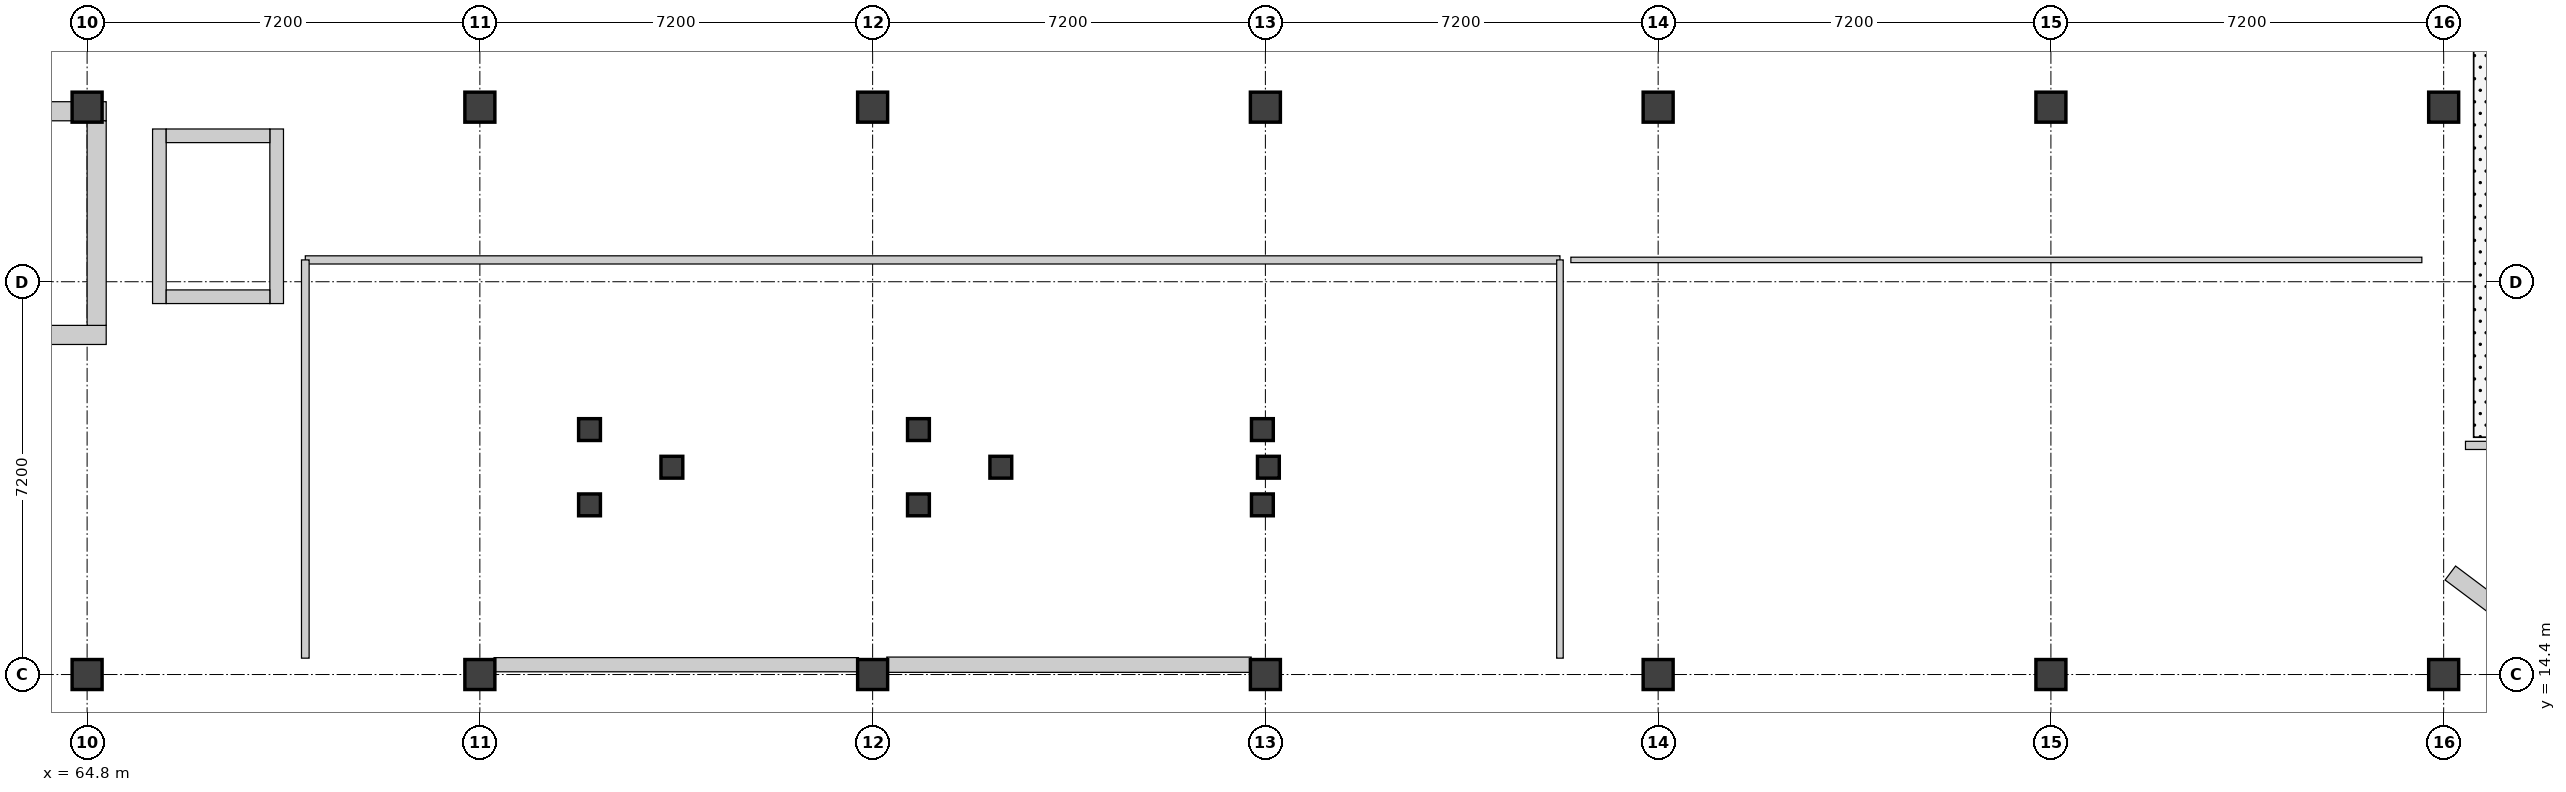
"""IFC4 building model, lengths in metres.
Left out: names, types, materials, properties, quantities, classifications, styles, units other than length and angle.
Written with IfcOpenShell. Run it as: python <this file> out.ifc"""

import sys

from ifc_helpers import new_model, si_unit, direction, frame, frame_2d, origin, origin_2d, place, context, subcontext, project, spatial, rectangle, extrude, element, fill, save


model = new_model("IFC4")
c1 = context("Model", 3, precision=1e-05, world=origin(), true_north=direction((0.0, 1.0)))
c2 = subcontext(c1, "Body", "Model", "MODEL_VIEW")
j1 = project(units=[si_unit("LENGTHUNIT", "METRE"), si_unit("PLANEANGLEUNIT", "RADIAN")], contexts=[c1])
p1 = place(None, origin())
s1 = spatial("IfcSite", under=j1, at=p1, CompositionType="ELEMENT")
p2 = place(p1, origin())
s2 = spatial("IfcBuilding", under=s1, at=p2, CompositionType="ELEMENT")
p3 = place(p2, origin())
s3 = spatial("IfcBuildingStorey", under=s2, at=p3, CompositionType="ELEMENT", Elevation=0.0)
for number, where, z_axis, x_axis in (
    (1, (64.8, 14.4, 0.0), (0.0, 0.0, 1.0), (1.0, 0.0, 0.0)),
    (2, (64.8, 24.8, 0.0), (0.0, 0.0, 1.0), (1.0, 0.0, 0.0)),
    (3, (72.0, 14.4, 0.0), (0.0, 0.0, 1.0), (1.0, 0.0, 0.0)),
    (4, (72.0, 24.8, 0.0), (0.0, 0.0, 1.0), (1.0, 0.0, 0.0)),
    (5, (79.2, 14.4, 0.0), (0.0, 0.0, 1.0), (1.0, 0.0, 0.0)),
    (6, (79.2, 24.8, 0.0), (0.0, 0.0, 1.0), (1.0, 0.0, 0.0)),
    (7, (86.4, 14.4, 0.0), (0.0, 0.0, 1.0), (1.0, 0.0, 0.0)),
    (8, (86.4, 24.8, 0.0), (0.0, 0.0, 1.0), (1.0, 0.0, 0.0)),
    (9, (93.6, 14.4, 0.0), (0.0, 0.0, 1.0), (1.0, 0.0, 0.0)),
    (10, (93.6, 24.8, 0.0), (0.0, 0.0, 1.0), (1.0, 0.0, 0.0)),
    (11, (100.8, 14.4, 0.0), (0.0, 0.0, 1.0), (1.0, 0.0, 0.0)),
    (12, (100.8, 24.8, 0.0), (0.0, 0.0, 1.0), (1.0, 0.0, 0.0)),
    (13, (108.0, 14.4, 0.0), (0.0, 0.0, 1.0), (1.0, 0.0, 0.0)),
    (14, (108.0, 24.8, 0.0), (0.0, 0.0, 1.0), (1.0, 0.0, 0.0)),
):
    element("IfcColumn", number, at=place(p3, frame(where, z_axis=z_axis, x_axis=x_axis)), inside=s3, PredefinedType="COLUMN", context=c2, shape_type="SweptSolid", body=[
        extrude(rectangle(XDim=0.55, YDim=0.55, at=origin_2d()), origin(), (0.0, 0.0, 1.0), 4.5),
    ])
p4 = place(p3, frame((86.14, 14.58, 0.0), z_axis=(0.0, 0.0, 1.0), x_axis=(-1.0, 0.0, 0.0)))
e15 = element("IfcWall", 15, at=p4, inside=s3, PredefinedType="SOLIDWALL", context=c2, shape_type="SweptSolid", body=[
    extrude(rectangle(XDim=6.68, YDim=0.28, at=frame_2d((3.34, 0.0))), origin(), (0.0, 0.0, 1.0), 3.54),
])
p5 = place(p4, frame((2.64, 0.0, 0.0)))
e16 = element("IfcOpeningElement", 16, at=p5, cuts=e15, PredefinedType="OPENING", context=c2, shape_type="SweptSolid", body=[
    extrude(rectangle(XDim=1.4, YDim=2.2, at=frame_2d((0.7, 1.1))), frame((0.0, 0.15, 0.0), z_axis=(0.0, -1.0, 0.0), x_axis=(1.0, 0.0, 0.0)), (0.0, 0.0, 1.0), 0.3),
])
p6 = place(p3, frame((78.94, 14.58, 0.0), z_axis=(0.0, 0.0, 1.0), x_axis=(-1.0, 0.0, 0.0)))
e17 = element("IfcWall", 17, at=p6, inside=s3, PredefinedType="SOLIDWALL", context=c2, shape_type="SweptSolid", body=[
    extrude(rectangle(XDim=6.68, YDim=0.26, at=frame_2d((3.34, 0.0))), origin(), (0.0, 0.0, 1.0), 3.49),
])
p7 = place(p6, frame((2.44, 0.0, 0.0)))
e18 = element("IfcOpeningElement", 18, at=p7, cuts=e17, PredefinedType="OPENING", context=c2, shape_type="SweptSolid", body=[
    extrude(rectangle(XDim=1.8, YDim=2.4, at=frame_2d((0.9, 1.2))), frame((0.0, 0.14, 0.0), z_axis=(0.0, -1.0, 0.0), x_axis=(1.0, 0.0, 0.0)), (0.0, 0.0, 1.0), 0.28),
])
p8 = place(p3, frame((110.494, 14.481, 0.0), z_axis=(0.0, 0.0, 1.0), x_axis=(-0.799792449124, 0.600276634831, 0.0)))
e19 = element("IfcWall", 19, at=p8, inside=s3, PredefinedType="SOLIDWALL", context=c2, shape_type="SweptSolid", body=[
    extrude(rectangle(XDim=2.965, YDim=0.32, at=frame_2d((1.482, 0.0))), origin(), (0.0, 0.0, 1.0), 3.49),
])
for number, where, z_axis, x_axis in (
    (20, (56.05, 20.625, 0.0), (0.0, 0.0, 1.0), (1.0, 0.0, 0.0)),
    (21, (65.15, 24.725, 0.0), (0.0, 0.0, 1.0), (-1.0, 0.0, 0.0)),
):
    element("IfcWall", number, at=place(p3, frame(where, z_axis=z_axis, x_axis=x_axis)), inside=s3, PredefinedType="SHEAR", context=c2, shape_type="SweptSolid", body=[
        extrude(rectangle(XDim=9.1, YDim=0.35, at=frame_2d((4.55, 0.0))), origin(), (0.0, 0.0, 1.0), 4.24),
    ])
p9 = place(p3, frame((64.975, 20.8, 0.0), z_axis=(0.0, 0.0, 1.0), x_axis=(0.0, 1.0, 0.0)))
e22 = element("IfcWall", 22, at=p9, inside=s3, PredefinedType="SHEAR", context=c2, shape_type="SweptSolid", body=[
    extrude(rectangle(XDim=3.75, YDim=0.35, at=frame_2d((1.875, 0.0))), origin(), (0.0, 0.0, 1.0), 4.24),
])
for number, where, z_axis, x_axis in (
    (23, (74.01, 17.51, 0.0), (0.0, 0.0, 1.0), (1.0, 0.0, 0.0)),
    (24, (74.01, 18.89, 0.0), (0.0, 0.0, 1.0), (1.0, 0.0, 0.0)),
    (25, (75.52, 18.2, 0.0), (0.0, 0.0, 1.0), (1.0, 0.0, 0.0)),
    (26, (80.04, 17.51, 0.0), (0.0, 0.0, 1.0), (1.0, 0.0, 0.0)),
    (27, (80.04, 18.89, 0.0), (0.0, 0.0, 1.0), (1.0, 0.0, 0.0)),
    (28, (81.55, 18.2, 0.0), (0.0, 0.0, 1.0), (1.0, 0.0, 0.0)),
    (29, (86.345, 17.51, 0.0), (0.0, 0.0, 1.0), (1.0, 0.0, 0.0)),
    (30, (86.345, 18.89, 0.0), (0.0, 0.0, 1.0), (1.0, 0.0, 0.0)),
    (31, (86.455, 18.2, 0.0), (0.0, 0.0, 1.0), (1.0, 0.0, 0.0)),
):
    element("IfcColumn", number, at=place(p3, frame(where, z_axis=z_axis, x_axis=x_axis)), inside=s3, PredefinedType="COLUMN", context=c2, shape_type="SweptSolid", body=[
        extrude(rectangle(XDim=0.4, YDim=0.4, at=origin_2d()), origin(), (0.0, 0.0, 1.0), 4.5),
    ])
for number, where, z_axis, x_axis in (
    (32, (66.125, 21.2, 0.0), (0.0, 0.0, 1.0), (0.0, 1.0, 0.0)),
    (33, (68.275, 24.4, 0.0), (0.0, 0.0, 1.0), (0.0, -1.0, 0.0)),
):
    element("IfcWall", number, at=place(p3, frame(where, z_axis=z_axis, x_axis=x_axis)), inside=s3, PredefinedType="SOLIDWALL", context=c2, shape_type="SweptSolid", body=[
        extrude(rectangle(XDim=3.2, YDim=0.25, at=frame_2d((1.6, 0.0))), origin(), (0.0, 0.0, 1.0), 4.24),
    ])
p10 = place(p3, frame((66.25, 21.325, 0.0), z_axis=(0.0, 0.0, 1.0), x_axis=(1.0, 0.0, 0.0)))
e34 = element("IfcWall", 34, at=p10, inside=s3, PredefinedType="SOLIDWALL", context=c2, shape_type="SweptSolid", body=[
    extrude(rectangle(XDim=1.9, YDim=0.25, at=frame_2d((0.95, 0.0))), origin(), (0.0, 0.0, 1.0), 4.24),
])
p11 = place(p10, frame((0.4, 0.0, 0.0)))
e35 = element("IfcOpeningElement", 35, at=p11, cuts=e34, PredefinedType="OPENING", context=c2, shape_type="SweptSolid", body=[
    extrude(rectangle(XDim=1.1, YDim=2.2, at=frame_2d((0.55, 1.1))), frame((0.0, 0.135, 0.0), z_axis=(0.0, -1.0, 0.0), x_axis=(1.0, 0.0, 0.0)), (0.0, 0.0, 1.0), 0.27),
])
p12 = place(p3, frame((68.15, 24.275, 0.0), z_axis=(0.0, 0.0, 1.0), x_axis=(-1.0, 0.0, 0.0)))
e36 = element("IfcWall", 36, at=p12, inside=s3, PredefinedType="SOLIDWALL", context=c2, shape_type="SweptSolid", body=[
    extrude(rectangle(XDim=1.9, YDim=0.25, at=frame_2d((0.95, 0.0))), origin(), (0.0, 0.0, 1.0), 4.24),
])
p13 = place(p3, frame((91.8, 22.0, 0.0), z_axis=(0.0, 0.0, 1.0), x_axis=(-1.0, 0.0, 0.0)))
e37 = element("IfcWall", 37, at=p13, inside=s3, PredefinedType="PARTITIONING", context=c2, shape_type="SweptSolid", body=[
    extrude(rectangle(XDim=23.0, YDim=0.15, at=frame_2d((11.5, 0.0))), origin(), (0.0, 0.0, 1.0), 3.48),
])
p14 = place(p13, frame((11.025, 0.0, 0.0)))
e38 = element("IfcOpeningElement", 38, at=p14, cuts=e37, PredefinedType="OPENING", context=c2, shape_type="SweptSolid", body=[
    extrude(rectangle(XDim=0.95, YDim=2.15, at=frame_2d((0.475, 1.075))), frame((0.0, 0.085, 0.0), z_axis=(0.0, -1.0, 0.0), x_axis=(1.0, 0.0, 0.0)), (0.0, 0.0, 1.0), 0.17),
])
p15 = place(p3, frame((68.8, 22.0, 0.0), z_axis=(0.0, 0.0, 1.0), x_axis=(0.0, -1.0, 0.0)))
e39 = element("IfcWall", 39, at=p15, inside=s3, PredefinedType="PARTITIONING", context=c2, shape_type="SweptSolid", body=[
    extrude(rectangle(XDim=7.3, YDim=0.14, at=frame_2d((3.65, 0.0))), origin(), (0.0, 0.0, 1.0), 4.24),
])
p16 = place(p3, frame((91.8, 14.7, 0.0), z_axis=(0.0, 0.0, 1.0), x_axis=(0.0, 1.0, 0.0)))
e40 = element("IfcWall", 40, at=p16, inside=s3, PredefinedType="PARTITIONING", context=c2, shape_type="SweptSolid", body=[
    extrude(rectangle(XDim=7.3, YDim=0.12, at=frame_2d((3.65, 0.0))), origin(), (0.0, 0.0, 1.0), 3.48),
])
p17 = place(p3, frame((107.6, 22.0, 0.0), z_axis=(0.0, 0.0, 1.0), x_axis=(-1.0, 0.0, 0.0)))
e41 = element("IfcWall", 41, at=p17, inside=s3, PredefinedType="PARTITIONING", context=c2, shape_type="SweptSolid", body=[
    extrude(rectangle(XDim=15.6, YDim=0.1, at=frame_2d((7.8, 0.0))), origin(), (0.0, 0.0, 1.0), 3.44),
])
p18 = place(p17, frame((7.35, 0.0, 0.0)))
e42 = element("IfcOpeningElement", 42, at=p18, cuts=e41, PredefinedType="OPENING", context=c2, shape_type="SweptSolid", body=[
    extrude(rectangle(XDim=0.9, YDim=2.1, at=frame_2d((0.45, 1.05))), frame((0.0, 0.06, 0.0), z_axis=(0.0, -1.0, 0.0), x_axis=(1.0, 0.0, 0.0)), (0.0, 0.0, 1.0), 0.12),
])
p19 = place(p3, frame((108.4, 18.6, 0.0), z_axis=(0.0, 0.0, 1.0), x_axis=(1.0, 0.0, 0.0)))
e43 = element("IfcWall", 43, at=p19, inside=s3, PredefinedType="PARTITIONING", context=c2, shape_type="SweptSolid", body=[
    extrude(rectangle(XDim=7.64, YDim=0.15, at=frame_2d((3.82, 0.0))), origin(), (0.0, 0.0, 1.0), 3.59),
])
p20 = place(p19, frame((3.77, 0.0, 0.0)))
e44 = element("IfcOpeningElement", 44, at=p20, cuts=e43, PredefinedType="OPENING", context=c2, shape_type="SweptSolid", body=[
    extrude(rectangle(XDim=1.25, YDim=2.2, at=frame_2d((0.625, 1.1))), frame((0.0, 0.085, 0.0), z_axis=(0.0, -1.0, 0.0), x_axis=(1.0, 0.0, 0.0)), (0.0, 0.0, 1.0), 0.17),
])
p21 = place(p5, origin())
e45 = element("IfcDoor", 45, at=p21, inside=s3, OperationType="SINGLE_SWING_RIGHT", PredefinedType="DOOR", context=c2, shape_type="SweptSolid", body=[
    extrude(rectangle(XDim=1.4, YDim=2.2, at=frame_2d((0.7, 1.1))), frame((0.0, 0.025, 0.0), z_axis=(0.0, -1.0, 0.0), x_axis=(1.0, 0.0, 0.0)), (0.0, 0.0, 1.0), 0.05),
])
fill(e16, e45)
p22 = place(p7, origin())
e46 = element("IfcDoor", 46, at=p22, inside=s3, OperationType="SINGLE_SWING_LEFT", PredefinedType="DOOR", context=c2, shape_type="SweptSolid", body=[
    extrude(rectangle(XDim=1.8, YDim=2.4, at=frame_2d((0.9, 1.2))), frame((0.0, 0.025, 0.0), z_axis=(0.0, -1.0, 0.0), x_axis=(1.0, 0.0, 0.0)), (0.0, 0.0, 1.0), 0.05),
])
fill(e18, e46)
p23 = place(p11, origin())
e47 = element("IfcDoor", 47, at=p23, inside=s3, OperationType="DOUBLE_DOOR_SLIDING", PredefinedType="DOOR", context=c2, shape_type="SweptSolid", body=[
    extrude(rectangle(XDim=1.1, YDim=2.2, at=frame_2d((0.55, 1.1))), frame((0.0, 0.025, 0.0), z_axis=(0.0, -1.0, 0.0), x_axis=(1.0, 0.0, 0.0)), (0.0, 0.0, 1.0), 0.05),
])
fill(e35, e47)
p24 = place(p14, origin())
e48 = element("IfcDoor", 48, at=p24, inside=s3, OperationType="SINGLE_SWING_RIGHT", PredefinedType="DOOR", context=c2, shape_type="SweptSolid", body=[
    extrude(rectangle(XDim=0.95, YDim=2.15, at=frame_2d((0.475, 1.075))), frame((0.0, 0.025, 0.0), z_axis=(0.0, -1.0, 0.0), x_axis=(1.0, 0.0, 0.0)), (0.0, 0.0, 1.0), 0.05),
])
fill(e38, e48)
p25 = place(p18, origin())
e49 = element("IfcDoor", 49, at=p25, inside=s3, OperationType="SINGLE_SWING_LEFT", PredefinedType="DOOR", context=c2, shape_type="SweptSolid", body=[
    extrude(rectangle(XDim=0.9, YDim=2.1, at=frame_2d((0.45, 1.05))), frame((0.0, 0.025, 0.0), z_axis=(0.0, -1.0, 0.0), x_axis=(1.0, 0.0, 0.0)), (0.0, 0.0, 1.0), 0.05),
])
fill(e42, e49)
save(model, sys.argv[1])
